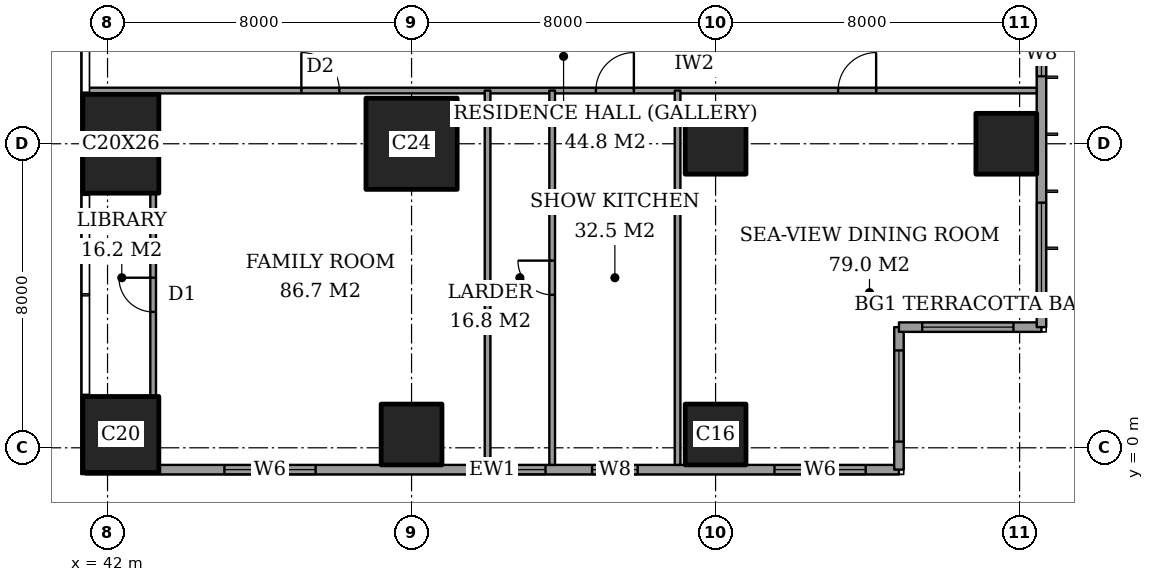
"""IFC4 building model, lengths in metres.
Left out: names, types, materials, properties, quantities, classifications, styles, units other than length and angle.
Written with IfcOpenShell. Run it as: python <this file> out.ifc"""

import sys

from ifc_helpers import new_model, si_unit, direction, frame, frame_2d, origin, origin_2d, place, context, subcontext, project, spatial, rectangle, extrude, element, fill, save


model = new_model("IFC4")
c1 = context("Model", 3, precision=1e-05, world=origin(), true_north=direction((0.0, 1.0)))
c2 = subcontext(c1, "Body", "Model", "MODEL_VIEW")
j1 = project(units=[si_unit("LENGTHUNIT", "METRE"), si_unit("PLANEANGLEUNIT", "RADIAN")], contexts=[c1])
p1 = place(None, origin())
s1 = spatial("IfcSite", under=j1, at=p1, CompositionType="ELEMENT")
p2 = place(p1, origin())
s2 = spatial("IfcBuilding", under=s1, at=p2, CompositionType="ELEMENT")
p3 = place(p2, frame((0.0, 0.0, 252.0)))
s3 = spatial("IfcBuildingStorey", under=s2, at=p3, CompositionType="ELEMENT", Elevation=252.0)
p4 = place(p3, frame((42.35, 0.35, 0.0), z_axis=(0.0, 0.0, 1.0), x_axis=(1.0, 0.0, 0.0)))
e1 = element("IfcColumn", 1, at=p4, inside=s3, PredefinedType="COLUMN", context=c2, shape_type="SweptSolid", body=[
    extrude(rectangle(XDim=2.0, YDim=2.0, at=origin_2d()), origin(), (0.0, 0.0, 1.0), 3.6),
])
p5 = place(p3, frame((42.35, 8.0, 0.0), z_axis=(0.0, 0.0, 1.0), x_axis=(1.0, 0.0, 0.0)))
e2 = element("IfcColumn", 2, at=p5, inside=s3, PredefinedType="COLUMN", context=c2, shape_type="SweptSolid", body=[
    extrude(rectangle(XDim=2.0, YDim=2.6, at=origin_2d()), origin(), (0.0, 0.0, 1.0), 3.6),
])
p6 = place(p3, frame((50.0, 0.35, 0.0), z_axis=(0.0, 0.0, 1.0), x_axis=(1.0, 0.0, 0.0)))
e3 = element("IfcColumn", 3, at=p6, inside=s3, PredefinedType="COLUMN", context=c2, shape_type="SweptSolid", body=[
    extrude(rectangle(XDim=1.6, YDim=1.6, at=origin_2d()), origin(), (0.0, 0.0, 1.0), 3.6),
])
p7 = place(p3, frame((50.0, 8.0, 0.0), z_axis=(0.0, 0.0, 1.0), x_axis=(1.0, 0.0, 0.0)))
e4 = element("IfcColumn", 4, at=p7, inside=s3, PredefinedType="COLUMN", context=c2, shape_type="SweptSolid", body=[
    extrude(rectangle(XDim=2.4, YDim=2.4, at=origin_2d()), origin(), (0.0, 0.0, 1.0), 3.6),
])
for number, where, z_axis, x_axis in (
    (5, (58.0, 0.35, 0.0), (0.0, 0.0, 1.0), (1.0, 0.0, 0.0)),
    (6, (58.0, 8.0, 0.0), (0.0, 0.0, 1.0), (1.0, 0.0, 0.0)),
    (7, (65.65, 8.0, 0.0), (0.0, 0.0, 1.0), (1.0, 0.0, 0.0)),
):
    element("IfcColumn", number, at=place(p3, frame(where, z_axis=z_axis, x_axis=x_axis)), inside=s3, PredefinedType="COLUMN", context=c2, shape_type="SweptSolid", body=[
        extrude(rectangle(XDim=1.6, YDim=1.6, at=origin_2d()), origin(), (0.0, 0.0, 1.0), 3.6),
    ])
p8 = place(p3, frame((41.425, -0.575, 0.0), z_axis=(0.0, 0.0, 1.0), x_axis=(1.0, 0.0, 0.0)))
e8 = element("IfcWall", 8, at=p8, inside=s3, PredefinedType="SOLIDWALL", context=c2, shape_type="SweptSolid", body=[
    extrude(rectangle(XDim=21.4, YDim=0.25, at=frame_2d((10.7, 0.0))), origin(), (0.0, 0.0, 1.0), 3.6),
])
p9 = place(p8, frame((3.65, 0.0, 0.6)))
e9 = element("IfcOpeningElement", 9, at=p9, cuts=e8, PredefinedType="OPENING", context=c2, shape_type="SweptSolid", body=[
    extrude(rectangle(XDim=2.4, YDim=2.0, at=frame_2d((1.2, 1.0))), frame((0.0, 0.135, 0.0), z_axis=(0.0, -1.0, 0.0), x_axis=(1.0, 0.0, 0.0)), (0.0, 0.0, 1.0), 0.27),
])
p10 = place(p8, frame((10.9, 0.0, 0.6)))
e10 = element("IfcOpeningElement", 10, at=p10, cuts=e8, PredefinedType="OPENING", context=c2, shape_type="SweptSolid", body=[
    extrude(rectangle(XDim=1.2, YDim=2.0, at=frame_2d((0.6, 1.0))), frame((0.0, 0.135, 0.0), z_axis=(0.0, -1.0, 0.0), x_axis=(1.0, 0.0, 0.0)), (0.0, 0.0, 1.0), 0.27),
])
p11 = place(p8, frame((13.325, 0.0, 0.6)))
e11 = element("IfcOpeningElement", 11, at=p11, cuts=e8, PredefinedType="OPENING", context=c2, shape_type="SweptSolid", body=[
    extrude(rectangle(XDim=1.2, YDim=2.0, at=frame_2d((0.6, 1.0))), frame((0.0, 0.135, 0.0), z_axis=(0.0, -1.0, 0.0), x_axis=(1.0, 0.0, 0.0)), (0.0, 0.0, 1.0), 0.27),
])
p12 = place(p8, frame((18.125, 0.0, 0.6)))
e12 = element("IfcOpeningElement", 12, at=p12, cuts=e8, PredefinedType="OPENING", context=c2, shape_type="SweptSolid", body=[
    extrude(rectangle(XDim=2.4, YDim=2.0, at=frame_2d((1.2, 1.0))), frame((0.0, 0.135, 0.0), z_axis=(0.0, -1.0, 0.0), x_axis=(1.0, 0.0, 0.0)), (0.0, 0.0, 1.0), 0.27),
])
p13 = place(p3, frame((62.825, -0.575, 0.0), z_axis=(0.0, 0.0, 1.0), x_axis=(0.0, 1.0, 0.0)))
e13 = element("IfcWall", 13, at=p13, inside=s3, PredefinedType="SOLIDWALL", context=c2, shape_type="SweptSolid", body=[
    extrude(rectangle(XDim=3.75, YDim=0.25, at=frame_2d((1.875, 0.0))), origin(), (0.0, 0.0, 1.0), 3.6),
])
p14 = place(p13, frame((0.738, 0.0, 0.6)))
e14 = element("IfcOpeningElement", 14, at=p14, cuts=e13, PredefinedType="OPENING", context=c2, shape_type="SweptSolid", body=[
    extrude(rectangle(XDim=2.4, YDim=2.0, at=frame_2d((1.2, 1.0))), frame((0.0, 0.135, 0.0), z_axis=(0.0, -1.0, 0.0), x_axis=(1.0, 0.0, 0.0)), (0.0, 0.0, 1.0), 0.27),
])
p15 = place(p3, frame((62.825, 3.175, 0.0), z_axis=(0.0, 0.0, 1.0), x_axis=(1.0, 0.0, 0.0)))
e15 = element("IfcWall", 15, at=p15, inside=s3, PredefinedType="SOLIDWALL", context=c2, shape_type="SweptSolid", body=[
    extrude(rectangle(XDim=3.75, YDim=0.25, at=frame_2d((1.875, 0.0))), origin(), (0.0, 0.0, 1.0), 3.6),
])
p16 = place(p15, frame((0.613, 0.0, 0.6)))
e16 = element("IfcOpeningElement", 16, at=p16, cuts=e15, PredefinedType="OPENING", context=c2, shape_type="SweptSolid", body=[
    extrude(rectangle(XDim=2.4, YDim=2.0, at=frame_2d((1.2, 1.0))), frame((0.0, 0.135, 0.0), z_axis=(0.0, -1.0, 0.0), x_axis=(1.0, 0.0, 0.0)), (0.0, 0.0, 1.0), 0.27),
])
p17 = place(p3, frame((66.575, 3.175, 0.0), z_axis=(0.0, 0.0, 1.0), x_axis=(0.0, 1.0, 0.0)))
e17 = element("IfcWall", 17, at=p17, inside=s3, PredefinedType="SOLIDWALL", context=c2, shape_type="SweptSolid", body=[
    extrude(rectangle(XDim=41.65, YDim=0.25, at=frame_2d((20.825, 0.0))), origin(), (0.0, 0.0, 1.0), 3.6),
])
p18 = place(p17, frame((0.875, 0.0, 0.6)))
e18 = element("IfcOpeningElement", 18, at=p18, cuts=e17, PredefinedType="OPENING", context=c2, shape_type="SweptSolid", body=[
    extrude(rectangle(XDim=2.4, YDim=2.0, at=frame_2d((1.2, 1.0))), frame((0.0, 0.135, 0.0), z_axis=(0.0, -1.0, 0.0), x_axis=(1.0, 0.0, 0.0)), (0.0, 0.0, 1.0), 0.27),
])
p19 = place(p17, frame((6.6, 0.0, 0.6)))
e19 = element("IfcOpeningElement", 19, at=p19, cuts=e17, PredefinedType="OPENING", context=c2, shape_type="SweptSolid", body=[
    extrude(rectangle(XDim=1.2, YDim=2.0, at=frame_2d((0.6, 1.0))), frame((0.0, 0.135, 0.0), z_axis=(0.0, -1.0, 0.0), x_axis=(1.0, 0.0, 0.0)), (0.0, 0.0, 1.0), 0.27),
])
p20 = place(p17, frame((8.825, 0.0, 0.6)))
e20 = element("IfcOpeningElement", 20, at=p20, cuts=e17, PredefinedType="OPENING", context=c2, shape_type="SweptSolid", body=[
    extrude(rectangle(XDim=2.4, YDim=2.0, at=frame_2d((1.2, 1.0))), frame((0.0, 0.135, 0.0), z_axis=(0.0, -1.0, 0.0), x_axis=(1.0, 0.0, 0.0)), (0.0, 0.0, 1.0), 0.27),
])
p21 = place(p17, frame((15.725, 0.0, 0.6)))
e21 = element("IfcOpeningElement", 21, at=p21, cuts=e17, PredefinedType="OPENING", context=c2, shape_type="SweptSolid", body=[
    extrude(rectangle(XDim=2.4, YDim=2.0, at=frame_2d((1.2, 1.0))), frame((0.0, 0.135, 0.0), z_axis=(0.0, -1.0, 0.0), x_axis=(1.0, 0.0, 0.0)), (0.0, 0.0, 1.0), 0.27),
])
p22 = place(p17, frame((23.625, 0.0, 0.6)))
e22 = element("IfcOpeningElement", 22, at=p22, cuts=e17, PredefinedType="OPENING", context=c2, shape_type="SweptSolid", body=[
    extrude(rectangle(XDim=2.4, YDim=2.0, at=frame_2d((1.2, 1.0))), frame((0.0, 0.135, 0.0), z_axis=(0.0, -1.0, 0.0), x_axis=(1.0, 0.0, 0.0)), (0.0, 0.0, 1.0), 0.27),
])
p23 = place(p17, frame((30.725, 0.0, 0.6)))
e23 = element("IfcOpeningElement", 23, at=p23, cuts=e17, PredefinedType="OPENING", context=c2, shape_type="SweptSolid", body=[
    extrude(rectangle(XDim=2.4, YDim=2.0, at=frame_2d((1.2, 1.0))), frame((0.0, 0.135, 0.0), z_axis=(0.0, -1.0, 0.0), x_axis=(1.0, 0.0, 0.0)), (0.0, 0.0, 1.0), 0.27),
])
p24 = place(p17, frame((34.525, 0.0, 0.6)))
e24 = element("IfcOpeningElement", 24, at=p24, cuts=e17, PredefinedType="OPENING", context=c2, shape_type="SweptSolid", body=[
    extrude(rectangle(XDim=1.2, YDim=2.0, at=frame_2d((0.6, 1.0))), frame((0.0, 0.135, 0.0), z_axis=(0.0, -1.0, 0.0), x_axis=(1.0, 0.0, 0.0)), (0.0, 0.0, 1.0), 0.27),
])
p25 = place(p17, frame((38.375, 0.0, 0.6)))
e25 = element("IfcOpeningElement", 25, at=p25, cuts=e17, PredefinedType="OPENING", context=c2, shape_type="SweptSolid", body=[
    extrude(rectangle(XDim=2.4, YDim=2.0, at=frame_2d((1.2, 1.0))), frame((0.0, 0.135, 0.0), z_axis=(0.0, -1.0, 0.0), x_axis=(1.0, 0.0, 0.0)), (0.0, 0.0, 1.0), 0.27),
])
p26 = place(p3, frame((41.439, 9.4, 0.0), z_axis=(0.0, 0.0, 1.0), x_axis=(1.0, 0.0, 0.0)))
e26 = element("IfcWall", 26, at=p26, inside=s3, PredefinedType="PARTITIONING", context=c2, shape_type="SweptSolid", body=[
    extrude(rectangle(XDim=25.011, YDim=0.15, at=frame_2d((12.505, 0.0))), origin(), (0.0, 0.0, 1.0), 3.35),
])
p27 = place(p26, frame((19.786, 0.0, 0.0)))
e27 = element("IfcOpeningElement", 27, at=p27, cuts=e26, PredefinedType="OPENING", context=c2, shape_type="SweptSolid", body=[
    extrude(rectangle(XDim=1.0, YDim=2.1, at=frame_2d((0.5, 1.05))), frame((0.0, 0.085, 0.0), z_axis=(0.0, -1.0, 0.0), x_axis=(1.0, 0.0, 0.0)), (0.0, 0.0, 1.0), 0.17),
])
p28 = place(p26, frame((13.411, 0.0, 0.0)))
e28 = element("IfcOpeningElement", 28, at=p28, cuts=e26, PredefinedType="OPENING", context=c2, shape_type="SweptSolid", body=[
    extrude(rectangle(XDim=1.0, YDim=2.1, at=frame_2d((0.5, 1.05))), frame((0.0, 0.085, 0.0), z_axis=(0.0, -1.0, 0.0), x_axis=(1.0, 0.0, 0.0)), (0.0, 0.0, 1.0), 0.17),
])
p29 = place(p26, frame((5.661, 0.0, 0.0)))
e29 = element("IfcOpeningElement", 29, at=p29, cuts=e26, PredefinedType="OPENING", context=c2, shape_type="SweptSolid", body=[
    extrude(rectangle(XDim=1.0, YDim=2.1, at=frame_2d((0.5, 1.05))), frame((0.0, 0.085, 0.0), z_axis=(0.0, -1.0, 0.0), x_axis=(1.0, 0.0, 0.0)), (0.0, 0.0, 1.0), 0.17),
])
p30 = place(p3, frame((43.2, 1.35, 0.0), z_axis=(0.0, 0.0, 1.0), x_axis=(0.0, 1.0, 0.0)))
e30 = element("IfcWall", 30, at=p30, inside=s3, PredefinedType="PARTITIONING", context=c2, shape_type="SweptSolid", body=[
    extrude(rectangle(XDim=5.35, YDim=0.15, at=frame_2d((2.675, 0.0))), origin(), (0.0, 0.0, 1.0), 3.35),
])
p31 = place(p30, frame((2.225, 0.0, 0.0)))
e31 = element("IfcOpeningElement", 31, at=p31, cuts=e30, PredefinedType="OPENING", context=c2, shape_type="SweptSolid", body=[
    extrude(rectangle(XDim=0.9, YDim=2.1, at=frame_2d((0.45, 1.05))), frame((0.0, 0.085, 0.0), z_axis=(0.0, -1.0, 0.0), x_axis=(1.0, 0.0, 0.0)), (0.0, 0.0, 1.0), 0.17),
])
p32 = place(p3, frame((52.0, -0.45, 0.0), z_axis=(0.0, 0.0, 1.0), x_axis=(0.0, 1.0, 0.0)))
e32 = element("IfcWall", 32, at=p32, inside=s3, PredefinedType="PARTITIONING", context=c2, shape_type="SweptSolid", body=[
    extrude(rectangle(XDim=9.85, YDim=0.15, at=frame_2d((4.925, 0.0))), origin(), (0.0, 0.0, 1.0), 3.35),
])
p33 = place(p3, frame((53.7, -0.45, 0.0), z_axis=(0.0, 0.0, 1.0), x_axis=(0.0, 1.0, 0.0)))
e33 = element("IfcWall", 33, at=p33, inside=s3, PredefinedType="PARTITIONING", context=c2, shape_type="SweptSolid", body=[
    extrude(rectangle(XDim=9.85, YDim=0.15, at=frame_2d((4.925, 0.0))), origin(), (0.0, 0.0, 1.0), 3.35),
])
p34 = place(p33, frame((4.475, 0.0, 0.0)))
e34 = element("IfcOpeningElement", 34, at=p34, cuts=e33, PredefinedType="OPENING", context=c2, shape_type="SweptSolid", body=[
    extrude(rectangle(XDim=0.9, YDim=2.1, at=frame_2d((0.45, 1.05))), frame((0.0, 0.085, 0.0), z_axis=(0.0, -1.0, 0.0), x_axis=(1.0, 0.0, 0.0)), (0.0, 0.0, 1.0), 0.17),
])
p35 = place(p3, frame((57.0, -0.45, 0.0), z_axis=(0.0, 0.0, 1.0), x_axis=(0.0, 1.0, 0.0)))
e35 = element("IfcWall", 35, at=p35, inside=s3, PredefinedType="PARTITIONING", context=c2, shape_type="SweptSolid", body=[
    extrude(rectangle(XDim=9.85, YDim=0.15, at=frame_2d((4.925, 0.0))), origin(), (0.0, 0.0, 1.0), 3.35),
])
p36 = place(p9, origin())
e36 = element("IfcWindow", 36, at=p36, inside=s3, PartitioningType="SINGLE_PANEL", PredefinedType="WINDOW", context=c2, shape_type="SweptSolid", body=[
    extrude(rectangle(XDim=2.4, YDim=2.0, at=frame_2d((1.2, 1.0))), frame((0.0, 0.03, 0.0), z_axis=(0.0, -1.0, 0.0), x_axis=(1.0, 0.0, 0.0)), (0.0, 0.0, 1.0), 0.06),
])
fill(e9, e36)
p37 = place(p10, origin())
e37 = element("IfcWindow", 37, at=p37, inside=s3, PartitioningType="SINGLE_PANEL", PredefinedType="WINDOW", context=c2, shape_type="SweptSolid", body=[
    extrude(rectangle(XDim=1.2, YDim=2.0, at=frame_2d((0.6, 1.0))), frame((0.0, 0.03, 0.0), z_axis=(0.0, -1.0, 0.0), x_axis=(1.0, 0.0, 0.0)), (0.0, 0.0, 1.0), 0.06),
])
fill(e10, e37)
p38 = place(p11, origin())
e38 = element("IfcWindow", 38, at=p38, inside=s3, PartitioningType="SINGLE_PANEL", PredefinedType="WINDOW", context=c2, shape_type="SweptSolid", body=[
    extrude(rectangle(XDim=1.2, YDim=2.0, at=frame_2d((0.6, 1.0))), frame((0.0, 0.03, 0.0), z_axis=(0.0, -1.0, 0.0), x_axis=(1.0, 0.0, 0.0)), (0.0, 0.0, 1.0), 0.06),
])
fill(e11, e38)
p39 = place(p12, origin())
e39 = element("IfcWindow", 39, at=p39, inside=s3, PartitioningType="SINGLE_PANEL", PredefinedType="WINDOW", context=c2, shape_type="SweptSolid", body=[
    extrude(rectangle(XDim=2.4, YDim=2.0, at=frame_2d((1.2, 1.0))), frame((0.0, 0.03, 0.0), z_axis=(0.0, -1.0, 0.0), x_axis=(1.0, 0.0, 0.0)), (0.0, 0.0, 1.0), 0.06),
])
fill(e12, e39)
p40 = place(p14, origin())
e40 = element("IfcWindow", 40, at=p40, inside=s3, PartitioningType="SINGLE_PANEL", PredefinedType="WINDOW", context=c2, shape_type="SweptSolid", body=[
    extrude(rectangle(XDim=2.4, YDim=2.0, at=frame_2d((1.2, 1.0))), frame((0.0, 0.03, 0.0), z_axis=(0.0, -1.0, 0.0), x_axis=(1.0, 0.0, 0.0)), (0.0, 0.0, 1.0), 0.06),
])
fill(e14, e40)
p41 = place(p16, origin())
e41 = element("IfcWindow", 41, at=p41, inside=s3, PartitioningType="SINGLE_PANEL", PredefinedType="WINDOW", context=c2, shape_type="SweptSolid", body=[
    extrude(rectangle(XDim=2.4, YDim=2.0, at=frame_2d((1.2, 1.0))), frame((0.0, 0.03, 0.0), z_axis=(0.0, -1.0, 0.0), x_axis=(1.0, 0.0, 0.0)), (0.0, 0.0, 1.0), 0.06),
])
fill(e16, e41)
p42 = place(p18, origin())
e42 = element("IfcWindow", 42, at=p42, inside=s3, PartitioningType="SINGLE_PANEL", PredefinedType="WINDOW", context=c2, shape_type="SweptSolid", body=[
    extrude(rectangle(XDim=2.4, YDim=2.0, at=frame_2d((1.2, 1.0))), frame((0.0, 0.03, 0.0), z_axis=(0.0, -1.0, 0.0), x_axis=(1.0, 0.0, 0.0)), (0.0, 0.0, 1.0), 0.06),
])
fill(e18, e42)
p43 = place(p19, origin())
e43 = element("IfcWindow", 43, at=p43, inside=s3, PartitioningType="SINGLE_PANEL", PredefinedType="WINDOW", context=c2, shape_type="SweptSolid", body=[
    extrude(rectangle(XDim=1.2, YDim=2.0, at=frame_2d((0.6, 1.0))), frame((0.0, 0.03, 0.0), z_axis=(0.0, -1.0, 0.0), x_axis=(1.0, 0.0, 0.0)), (0.0, 0.0, 1.0), 0.06),
])
fill(e19, e43)
p44 = place(p27, origin())
e44 = element("IfcDoor", 44, at=p44, inside=s3, OperationType="SINGLE_SWING_LEFT", PredefinedType="DOOR", context=c2, shape_type="SweptSolid", body=[
    extrude(rectangle(XDim=1.0, YDim=2.1, at=frame_2d((0.5, 1.05))), frame((0.0, 0.025, 0.0), z_axis=(0.0, -1.0, 0.0), x_axis=(1.0, 0.0, 0.0)), (0.0, 0.0, 1.0), 0.05),
])
fill(e27, e44)
p45 = place(p28, origin())
e45 = element("IfcDoor", 45, at=p45, inside=s3, OperationType="SINGLE_SWING_LEFT", PredefinedType="DOOR", context=c2, shape_type="SweptSolid", body=[
    extrude(rectangle(XDim=1.0, YDim=2.1, at=frame_2d((0.5, 1.05))), frame((0.0, 0.025, 0.0), z_axis=(0.0, -1.0, 0.0), x_axis=(1.0, 0.0, 0.0)), (0.0, 0.0, 1.0), 0.05),
])
fill(e28, e45)
p46 = place(p34, origin())
e46 = element("IfcDoor", 46, at=p46, inside=s3, OperationType="SINGLE_SWING_LEFT", PredefinedType="DOOR", context=c2, shape_type="SweptSolid", body=[
    extrude(rectangle(XDim=0.9, YDim=2.1, at=frame_2d((0.45, 1.05))), frame((0.0, 0.025, 0.0), z_axis=(0.0, -1.0, 0.0), x_axis=(1.0, 0.0, 0.0)), (0.0, 0.0, 1.0), 0.05),
])
fill(e34, e46)
p47 = place(p29, origin())
e47 = element("IfcDoor", 47, at=p47, inside=s3, OperationType="SINGLE_SWING_RIGHT", PredefinedType="DOOR", context=c2, shape_type="SweptSolid", body=[
    extrude(rectangle(XDim=1.0, YDim=2.1, at=frame_2d((0.5, 1.05))), frame((0.0, 0.025, 0.0), z_axis=(0.0, -1.0, 0.0), x_axis=(1.0, 0.0, 0.0)), (0.0, 0.0, 1.0), 0.05),
])
fill(e29, e47)
p48 = place(p31, origin())
e48 = element("IfcDoor", 48, at=p48, inside=s3, OperationType="SINGLE_SWING_LEFT", PredefinedType="DOOR", context=c2, shape_type="SweptSolid", body=[
    extrude(rectangle(XDim=0.9, YDim=2.1, at=frame_2d((0.45, 1.05))), frame((0.0, 0.025, 0.0), z_axis=(0.0, -1.0, 0.0), x_axis=(1.0, 0.0, 0.0)), (0.0, 0.0, 1.0), 0.05),
])
fill(e31, e48)
save(model, sys.argv[1])
